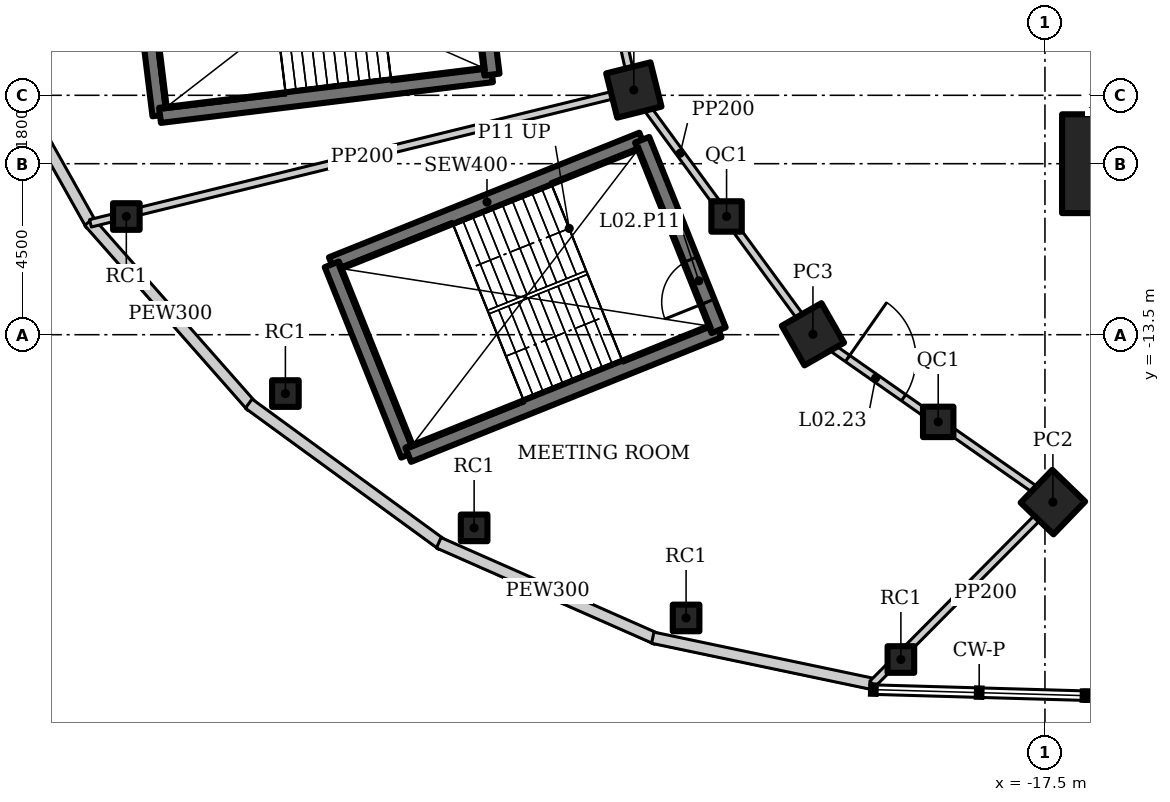
"""IFC4 building model, lengths in metres.
Left out: names, types, materials, properties, quantities, classifications, styles, units other than length and angle.
Written with IfcOpenShell. Run it as: python <this file> out.ifc"""

import sys

from ifc_helpers import new_model, si_unit, direction, frame, frame_2d, origin, origin_2d, place, context, subcontext, project, spatial, rectangle, hollow_rectangle, extrude, element, fill, save


model = new_model("IFC4")
c1 = context("Model", 3, precision=1e-05, world=origin(), true_north=direction((0.0, 1.0)))
c2 = subcontext(c1, "Body", "Model", "MODEL_VIEW")
j1 = project(units=[si_unit("LENGTHUNIT", "METRE"), si_unit("PLANEANGLEUNIT", "RADIAN")], contexts=[c1])
p1 = place(None, origin())
s1 = spatial("IfcSite", under=j1, at=p1, CompositionType="ELEMENT")
p2 = place(p1, origin())
s2 = spatial("IfcBuilding", under=s1, at=p2, CompositionType="ELEMENT")
p3 = place(p2, frame((0.0, 0.0, 14.5)))
s3 = spatial("IfcBuildingStorey", under=s2, at=p3, CompositionType="ELEMENT", Elevation=14.5)
p4 = place(p3, frame((-15.75, -9.0, 0.0), z_axis=(0.0, 0.0, 1.0), x_axis=(1.0, 0.0, 0.0)))
e1 = element("IfcColumn", 1, at=p4, inside=s3, PredefinedType="COLUMN", context=c2, shape_type="SweptSolid", body=[
    extrude(hollow_rectangle(XDim=2.6, YDim=2.6, WallThickness=0.13, at=origin_2d()), origin(), (0.0, 0.0, 1.0), 7.5),
])
p5 = place(p3, frame((-28.318, -7.06, 0.0), z_axis=(0.0, 0.0, 1.0), x_axis=(0.970295726276, 0.2419218956, 0.0)))
e2 = element("IfcColumn", 2, at=p5, inside=s3, PredefinedType="COLUMN", context=c2, shape_type="SweptSolid", body=[
    extrude(hollow_rectangle(XDim=1.2, YDim=1.2, WallThickness=0.1, at=origin_2d()), origin(), (0.0, 0.0, 1.0), 7.5),
])
p6 = place(p3, frame((-23.605, -13.489, 0.0), z_axis=(0.0, 0.0, 1.0), x_axis=(0.86824298017, 0.496139221777, 0.0)))
e3 = element("IfcColumn", 3, at=p6, inside=s3, PredefinedType="COLUMN", context=c2, shape_type="SweptSolid", body=[
    extrude(hollow_rectangle(XDim=1.2, YDim=1.2, WallThickness=0.12, at=origin_2d()), origin(), (0.0, 0.0, 1.0), 7.5),
])
p7 = place(p3, frame((-17.291, -17.905, 0.0), z_axis=(0.0, 0.0, 1.0), x_axis=(0.694658370459, 0.719339800339, 0.0)))
e4 = element("IfcColumn", 4, at=p7, inside=s3, PredefinedType="COLUMN", context=c2, shape_type="SweptSolid", body=[
    extrude(hollow_rectangle(XDim=1.2, YDim=1.2, WallThickness=0.1, at=origin_2d()), origin(), (0.0, 0.0, 1.0), 7.5),
])
for number, where, z_axis, x_axis in (
    (5, (-25.878, -10.388, 0.0), (0.0, 0.0, 1.0), (1.0, 0.0, 0.0)),
    (6, (-20.309, -15.794, 0.0), (0.0, 0.0, 1.0), (1.0, 0.0, 0.0)),
):
    element("IfcColumn", number, at=place(p3, frame(where, z_axis=z_axis, x_axis=x_axis)), inside=s3, PredefinedType="COLUMN", context=c2, shape_type="SweptSolid", body=[
        extrude(hollow_rectangle(XDim=0.8, YDim=0.8, WallThickness=0.05, at=origin_2d()), origin(), (0.0, 0.0, 1.0), 7.5),
    ])
for number, where, z_axis, x_axis in (
    (7, (-37.487, -15.049, 0.0), (0.0, 0.0, 1.0), (1.0, 0.0, 0.0)),
    (8, (-26.943, -20.954, 0.0), (0.0, 0.0, 1.0), (1.0, 0.0, 0.0)),
    (9, (-41.672, -10.39, 0.0), (0.0, 0.0, 1.0), (1.0, 0.0, 0.0)),
    (10, (-32.521, -18.583, 0.0), (0.0, 0.0, 1.0), (1.0, 0.0, 0.0)),
    (11, (-21.291, -22.047, 0.0), (0.0, 0.0, 1.0), (1.0, 0.0, 0.0)),
):
    element("IfcColumn", number, at=place(p3, frame(where, z_axis=z_axis, x_axis=x_axis)), inside=s3, PredefinedType="COLUMN", context=c2, shape_type="SweptSolid", body=[
        extrude(hollow_rectangle(XDim=0.7, YDim=0.7, WallThickness=0.04, at=origin_2d()), origin(), (0.0, 0.0, 1.0), 7.5),
    ])
p8 = place(p3, frame((-45.469, -5.488, 0.0), z_axis=(0.0, 0.0, 1.0), x_axis=(0.489563544979, -0.871967622924, 0.0)))
e12 = element("IfcWall", 12, at=p8, inside=s3, PredefinedType="SOLIDWALL", context=c2, shape_type="SweptSolid", body=[
    extrude(rectangle(XDim=5.883, YDim=0.3, at=frame_2d((2.941, 0.0))), origin(), (0.0, 0.0, 1.0), 7.3),
])
p9 = place(p3, frame((-42.654, -10.527, 0.0), z_axis=(0.0, 0.0, 1.0), x_axis=(0.661196672464, -0.75021261008, 0.0)))
e13 = element("IfcWall", 13, at=p9, inside=s3, PredefinedType="SOLIDWALL", context=c2, shape_type="SweptSolid", body=[
    extrude(rectangle(XDim=6.481, YDim=0.3, at=frame_2d((3.24, 0.0))), origin(), (0.0, 0.0, 1.0), 7.3),
])
p10 = place(p3, frame((-38.451, -15.314, 0.0), z_axis=(0.0, 0.0, 1.0), x_axis=(0.807903497184, -0.589314804868, 0.0)))
e14 = element("IfcWall", 14, at=p10, inside=s3, PredefinedType="SOLIDWALL", context=c2, shape_type="SweptSolid", body=[
    extrude(rectangle(XDim=6.308, YDim=0.3, at=frame_2d((3.154, 0.0))), origin(), (0.0, 0.0, 1.0), 7.3),
])
p11 = place(p3, frame((-33.451, -18.976, 0.0), z_axis=(0.0, 0.0, 1.0), x_axis=(0.914840828207, -0.40381463451, 0.0)))
e15 = element("IfcWall", 15, at=p11, inside=s3, PredefinedType="SOLIDWALL", context=c2, shape_type="SweptSolid", body=[
    extrude(rectangle(XDim=6.271, YDim=0.3, at=frame_2d((3.136, 0.0))), origin(), (0.0, 0.0, 1.0), 7.3),
])
p12 = place(p3, frame((-27.82, -21.474, 0.0), z_axis=(0.0, 0.0, 1.0), x_axis=(0.978625319268, -0.205651366364, 0.0)))
e16 = element("IfcWall", 16, at=p12, inside=s3, PredefinedType="SOLIDWALL", context=c2, shape_type="SweptSolid", body=[
    extrude(rectangle(XDim=5.962, YDim=0.3, at=frame_2d((2.981, 0.0))), origin(), (0.0, 0.0, 1.0), 7.3),
])
p13 = place(p3, frame((-29.099, -3.573, 0.0), z_axis=(0.0, 0.0, 1.0), x_axis=(0.218673326171, -0.97579812278, 0.0)))
e17 = element("IfcWall", 17, at=p13, inside=s3, PredefinedType="SOLIDWALL", context=c2, shape_type="SweptSolid", body=[
    extrude(rectangle(XDim=3.574, YDim=0.2, at=frame_2d((1.787, 0.0))), origin(), (0.0, 0.0, 1.0), 6.896),
])
p14 = place(p3, frame((-28.318, -7.06, 0.0), z_axis=(0.0, 0.0, 1.0), x_axis=(0.591255937291, -0.806483984105, 0.0)))
e18 = element("IfcWall", 18, at=p14, inside=s3, PredefinedType="SOLIDWALL", context=c2, shape_type="SweptSolid", body=[
    extrude(rectangle(XDim=4.127, YDim=0.2, at=frame_2d((2.063, 0.0))), origin(), (0.0, 0.0, 1.0), 5.8),
])
p15 = place(p3, frame((-25.878, -10.388, 0.0), z_axis=(0.0, 0.0, 1.0), x_axis=(0.591286566758, -0.806461527893, 0.0)))
e19 = element("IfcWall", 19, at=p15, inside=s3, PredefinedType="SOLIDWALL", context=c2, shape_type="SweptSolid", body=[
    extrude(rectangle(XDim=3.844, YDim=0.2, at=frame_2d((1.922, 0.0))), origin(), (0.0, 0.0, 1.0), 6.896),
])
p16 = place(p3, frame((-23.605, -13.489, 0.0), z_axis=(0.0, 0.0, 1.0), x_axis=(0.819442856133, -0.573160889744, 0.0)))
e20 = element("IfcWall", 20, at=p16, inside=s3, PredefinedType="SOLIDWALL", context=c2, shape_type="SweptSolid", body=[
    extrude(rectangle(XDim=4.023, YDim=0.2, at=frame_2d((2.011, 0.0))), origin(), (0.0, 0.0, 1.0), 5.8),
])
p17 = place(p16, frame((1.111, 0.0, 0.0)))
e21 = element("IfcOpeningElement", 21, at=p17, cuts=e20, PredefinedType="OPENING", context=c2, shape_type="SweptSolid", body=[
    extrude(rectangle(XDim=1.8, YDim=2.4, at=frame_2d((0.9, 1.2))), frame((0.0, 0.11, 0.0), z_axis=(0.0, -1.0, 0.0), x_axis=(1.0, 0.0, 0.0)), (0.0, 0.0, 1.0), 0.22),
])
p18 = place(p3, frame((-20.309, -15.794, 0.0), z_axis=(0.0, 0.0, 1.0), x_axis=(0.819409395821, -0.573208724672, 0.0)))
e22 = element("IfcWall", 22, at=p18, inside=s3, PredefinedType="SOLIDWALL", context=c2, shape_type="SweptSolid", body=[
    extrude(rectangle(XDim=3.683, YDim=0.2, at=frame_2d((1.841, 0.0))), origin(), (0.0, 0.0, 1.0), 6.896),
])
p19 = place(p3, frame((-28.318, -7.06, 0.0), z_axis=(0.0, 0.0, 1.0), x_axis=(-0.971190644534, -0.238303864783, 0.0)))
e23 = element("IfcWall", 23, at=p19, inside=s3, PredefinedType="SOLIDWALL", context=c2, shape_type="SweptSolid", body=[
    extrude(rectangle(XDim=14.723, YDim=0.2, at=frame_2d((7.361, 0.0))), origin(), (0.0, 0.0, 1.0), 5.8),
])
p20 = place(p3, frame((-17.291, -17.905, 0.0), z_axis=(0.0, 0.0, 1.0), x_axis=(-0.704348079756, -0.709854761585, 0.0)))
e24 = element("IfcWall", 24, at=p20, inside=s3, PredefinedType="SOLIDWALL", context=c2, shape_type="SweptSolid", body=[
    extrude(rectangle(XDim=6.739, YDim=0.2, at=frame_2d((3.37, 0.0))), origin(), (0.0, 0.0, 1.0), 6.698),
])
p21 = place(p3, frame((-41.443, -2.368, 0.0), z_axis=(0.0, 0.0, 1.0), x_axis=(0.121892082937, -0.992543359314, 0.0)))
e25 = element("IfcWall", 25, at=p21, inside=s3, PredefinedType="SHEAR", context=c2, shape_type="SweptSolid", body=[
    extrude(rectangle(XDim=5.4, YDim=0.4, at=frame_2d((2.7, 0.0))), origin(), (0.0, 0.0, 1.0), 7.5),
])
p22 = place(p3, frame((-40.785, -7.728, 0.0), z_axis=(0.0, 0.0, 1.0), x_axis=(0.992545280606, 0.121876437212, 0.0)))
e26 = element("IfcWall", 26, at=p22, inside=s3, PredefinedType="SHEAR", context=c2, shape_type="SweptSolid", body=[
    extrude(rectangle(XDim=8.8, YDim=0.4, at=frame_2d((4.4, 0.0))), origin(), (0.0, 0.0, 1.0), 7.5),
])
p23 = place(p3, frame((-32.051, -6.656, 0.0), z_axis=(0.0, 0.0, 1.0), x_axis=(-0.12184754212, 0.99254882826, 0.0)))
e27 = element("IfcWall", 27, at=p23, inside=s3, PredefinedType="SHEAR", context=c2, shape_type="SweptSolid", body=[
    extrude(rectangle(XDim=5.4, YDim=0.4, at=frame_2d((2.7, 0.0))), origin(), (0.0, 0.0, 1.0), 7.5),
])
p24 = place(p23, frame((0.8, 0.0, 0.0)))
e28 = element("IfcOpeningElement", 28, at=p24, cuts=e27, PredefinedType="OPENING", context=c2, shape_type="SweptSolid", body=[
    extrude(rectangle(XDim=1.2, YDim=2.1, at=frame_2d((0.6, 1.05))), frame((0.0, 0.21, 0.0), z_axis=(0.0, -1.0, 0.0), x_axis=(1.0, 0.0, 0.0)), (0.0, 0.0, 1.0), 0.42),
])
p25 = place(p3, frame((-28.099, -8.371, 0.0), z_axis=(0.0, 0.0, 1.0), x_axis=(-0.92801678004, -0.372538395288, 0.0)))
e29 = element("IfcWall", 29, at=p25, inside=s3, PredefinedType="SHEAR", context=c2, shape_type="SweptSolid", body=[
    extrude(rectangle(XDim=8.8, YDim=0.4, at=frame_2d((4.4, 0.0))), origin(), (0.0, 0.0, 1.0), 7.5),
])
p26 = place(p3, frame((-36.265, -11.649, 0.0), z_axis=(0.0, 0.0, 1.0), x_axis=(0.372544066459, -0.928014503414, 0.0)))
e30 = element("IfcWall", 30, at=p26, inside=s3, PredefinedType="SHEAR", context=c2, shape_type="SweptSolid", body=[
    extrude(rectangle(XDim=5.4, YDim=0.4, at=frame_2d((2.7, 0.0))), origin(), (0.0, 0.0, 1.0), 7.5),
])
p27 = place(p3, frame((-34.253, -16.66, 0.0), z_axis=(0.0, 0.0, 1.0), x_axis=(0.92801678004, 0.372538395288, 0.0)))
e31 = element("IfcWall", 31, at=p27, inside=s3, PredefinedType="SHEAR", context=c2, shape_type="SweptSolid", body=[
    extrude(rectangle(XDim=8.8, YDim=0.4, at=frame_2d((4.4, 0.0))), origin(), (0.0, 0.0, 1.0), 7.5),
])
p28 = place(p3, frame((-26.087, -13.382, 0.0), z_axis=(0.0, 0.0, 1.0), x_axis=(-0.372544066459, 0.928014503414, 0.0)))
e32 = element("IfcWall", 32, at=p28, inside=s3, PredefinedType="SHEAR", context=c2, shape_type="SweptSolid", body=[
    extrude(rectangle(XDim=5.4, YDim=0.4, at=frame_2d((2.7, 0.0))), origin(), (0.0, 0.0, 1.0), 7.5),
])
p29 = place(p28, frame((0.8, 0.0, 0.0)))
e33 = element("IfcOpeningElement", 33, at=p29, cuts=e32, PredefinedType="OPENING", context=c2, shape_type="SweptSolid", body=[
    extrude(rectangle(XDim=1.2, YDim=2.1, at=frame_2d((0.6, 1.05))), frame((0.0, 0.21, 0.0), z_axis=(0.0, -1.0, 0.0), x_axis=(1.0, 0.0, 0.0)), (0.0, 0.0, 1.0), 0.42),
])
p30 = place(p17, origin())
e34 = element("IfcDoor", 34, at=p30, inside=s3, OperationType="DOUBLE_DOOR_DOUBLE_SWING", PredefinedType="DOOR", context=c2, shape_type="SweptSolid", body=[
    extrude(rectangle(XDim=1.8, YDim=2.4, at=frame_2d((0.9, 1.2))), frame((0.0, 0.025, 0.0), z_axis=(0.0, -1.0, 0.0), x_axis=(1.0, 0.0, 0.0)), (0.0, 0.0, 1.0), 0.05),
])
fill(e21, e34)
p31 = place(p29, origin())
e35 = element("IfcDoor", 35, at=p31, inside=s3, OperationType="SINGLE_SWING_RIGHT", PredefinedType="DOOR", context=c2, shape_type="SweptSolid", body=[
    extrude(rectangle(XDim=1.2, YDim=2.1, at=frame_2d((0.6, 1.05))), frame((0.0, 0.025, 0.0), z_axis=(0.0, -1.0, 0.0), x_axis=(1.0, 0.0, 0.0)), (0.0, 0.0, 1.0), 0.05),
])
fill(e33, e35)
save(model, sys.argv[1])
